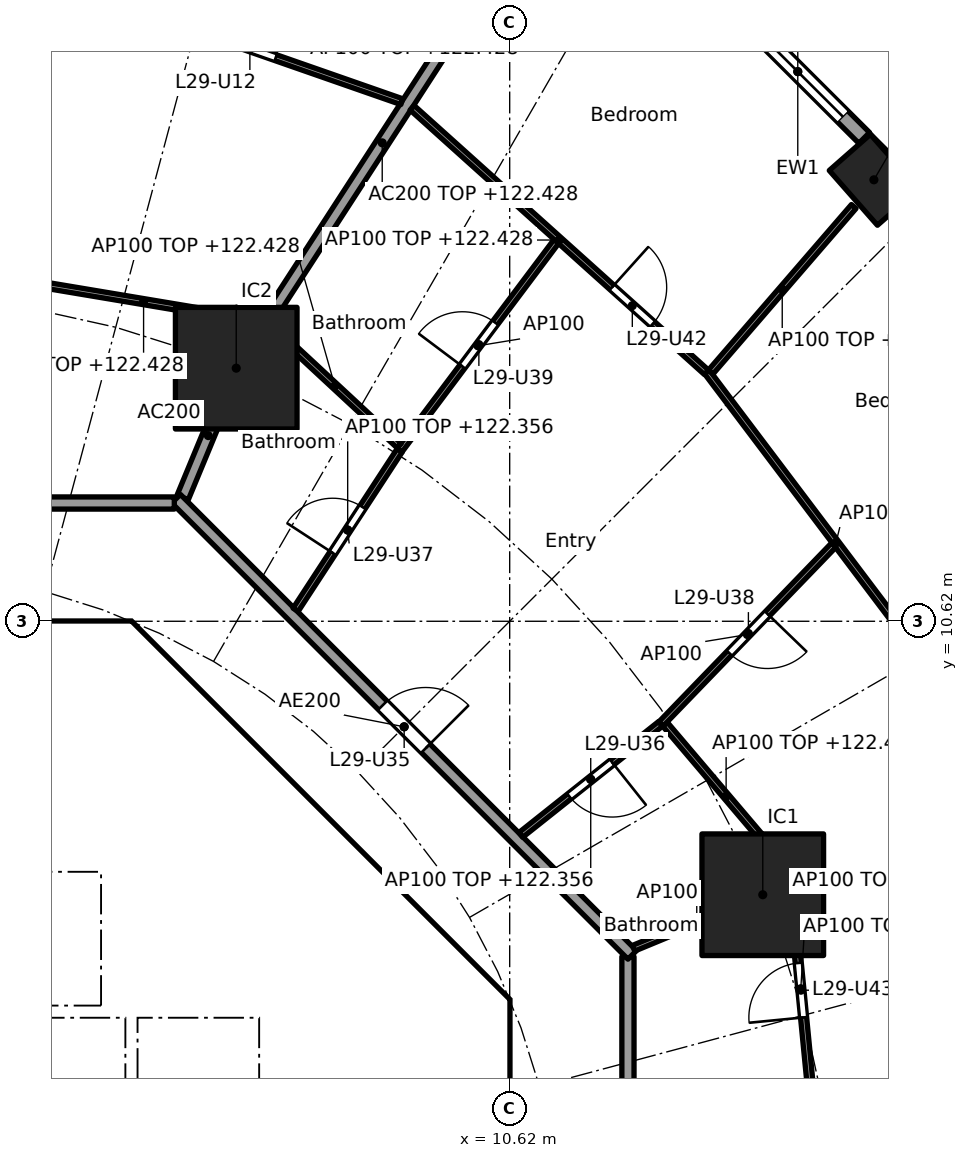
"""IFC4 building model, lengths in metres.
Left out: names, types, materials, properties, quantities, classifications, styles, units other than length and angle.
Written with IfcOpenShell. Run it as: python <this file> out.ifc"""

import sys

from ifc_helpers import new_model, si_unit, direction, frame, frame_2d, origin, origin_2d, place, context, subcontext, project, spatial, polyline, rectangle, hollow_rectangle, outline, extrude, element, fill, save


model = new_model("IFC4")
c1 = context("Model", 3, precision=1e-05, world=origin(), true_north=direction((0.0, 1.0)))
c2 = subcontext(c1, "Body", "Model", "MODEL_VIEW")
j1 = project(units=[si_unit("LENGTHUNIT", "METRE"), si_unit("PLANEANGLEUNIT", "RADIAN")], contexts=[c1])
p1 = place(None, origin())
s1 = spatial("IfcSite", under=j1, at=p1, CompositionType="ELEMENT")
p2 = place(p1, origin())
s2 = spatial("IfcBuilding", under=s1, at=p2, CompositionType="ELEMENT")
p3 = place(p2, frame((0.0, 0.0, 119.6)))
s3 = spatial("IfcBuildingStorey", under=s2, at=p3, CompositionType="ELEMENT", Elevation=119.6)
p4 = place(p3, frame((16.61, 17.88, -0.26), z_axis=(0.0, 0.0, 1.0), x_axis=(-0.660114607735, 0.751164898445, 0.0)))
e1 = element("IfcColumn", 1, at=p4, inside=s3, PredefinedType="COLUMN", context=c2, shape_type="SweptSolid", body=[
    extrude(hollow_rectangle(XDim=1.2, YDim=0.9, WallThickness=0.04, at=origin_2d()), origin(), (0.0, 0.0, 1.0), 3.96),
])
for number, where, z_axis, x_axis in (
    (2, (14.782, 6.123, 0.0), (0.0, 0.0, 1.0), (1.0, 0.0, 0.0)),
    (3, (6.123, 14.782, 0.0), (0.0, 0.0, 1.0), (1.0, 0.0, 0.0)),
):
    element("IfcColumn", number, at=place(p3, frame(where, z_axis=z_axis, x_axis=x_axis)), inside=s3, PredefinedType="COLUMN", context=c2, shape_type="SweptSolid", body=[
        extrude(rectangle(XDim=2.0, YDim=2.0, at=origin_2d()), origin(), (0.0, 0.0, 1.0), 3.7),
    ])
p5 = place(p3, frame((14.265, 20.749, 0.0), z_axis=(0.0, 0.0, 1.0), x_axis=(0.70789728551, -0.706315392135, 0.0)))
e4 = element("IfcWall", 4, at=p5, inside=s3, PredefinedType="SOLIDWALL", context=c2, shape_type="SweptSolid", body=[
    extrude(rectangle(XDim=3.087, YDim=0.25, at=frame_2d((1.543, 0.0))), origin(), (0.0, 0.0, 1.0), 3.44),
])
p6 = place(p5, frame((0.493, 0.0, 0.0)))
e5 = element("IfcOpeningElement", 5, at=p6, cuts=e4, PredefinedType="OPENING", context=c2, shape_type="SweptSolid", body=[
    extrude(rectangle(XDim=2.1, YDim=2.4, at=frame_2d((1.05, 1.2))), frame((0.0, 0.135, 0.0), z_axis=(0.0, -1.0, 0.0), x_axis=(1.0, 0.0, 0.0)), (0.0, 0.0, 1.0), 0.27),
])
p7 = place(p3, frame((14.315, 26.993, 0.0), z_axis=(0.0, 0.0, 1.0), x_axis=(0.610279766338, -0.792185967307, 0.0)))
e6 = element("IfcWall", 6, at=p7, inside=s3, PredefinedType="SOLIDWALL", context=c2, shape_type="SweptSolid", body=[
    extrude(rectangle(XDim=10.842, YDim=1.6, at=frame_2d((5.421, 0.0))), origin(), (0.0, 0.0, 1.0), 1.1),
])
p8 = place(p3, frame((9.988, 4.613, 0.0), z_axis=(0.0, 0.0, 1.0), x_axis=(-0.707106781187, 0.707106781187, 0.0)))
e7 = element("IfcWall", 7, at=p8, inside=s3, PredefinedType="SHEAR", context=c2, shape_type="SweptSolid", body=[
    extrude(rectangle(XDim=7.602, YDim=0.6, at=frame_2d((3.801, 0.0))), origin(), (0.0, 0.0, 1.0), 3.44),
])
p9 = place(p8, frame((3.201, 0.0, 0.0)))
e8 = element("IfcOpeningElement", 8, at=p9, cuts=e7, PredefinedType="OPENING", context=c2, shape_type="SweptSolid", body=[
    extrude(rectangle(XDim=1.2, YDim=2.1, at=frame_2d((0.6, 1.05))), frame((0.0, 0.31, 0.0), z_axis=(0.0, -1.0, 0.0), x_axis=(1.0, 0.0, 0.0)), (0.0, 0.0, 1.0), 0.62),
])
p10 = place(p3, frame((4.0, 4.3, 0.0), z_axis=(0.0, 0.0, 1.0), x_axis=(0.0, 1.0, 0.0)))
e9 = element("IfcWall", 9, at=p10, inside=s3, PredefinedType="SOLIDWALL", context=c2, shape_type="SweptSolid", body=[
    extrude(rectangle(XDim=2.2, YDim=0.2, at=frame_2d((1.1, 0.0))), origin(), (0.0, 0.0, 1.0), 3.44),
])
p11 = place(p10, frame((0.55, 0.0, 0.0)))
e10 = element("IfcOpeningElement", 10, at=p11, cuts=e9, PredefinedType="OPENING", context=c2, shape_type="SweptSolid", body=[
    extrude(rectangle(XDim=1.1, YDim=2.1, at=frame_2d((0.55, 1.05))), frame((0.0, 0.11, 0.0), z_axis=(0.0, -1.0, 0.0), x_axis=(1.0, 0.0, 0.0)), (0.0, 0.0, 1.0), 0.22),
])
p12 = place(p3, frame((6.7, 4.0, 0.0), z_axis=(0.0, 0.0, 1.0), x_axis=(1.0, 0.0, 0.0)))
e11 = element("IfcWall", 11, at=p12, inside=s3, PredefinedType="SOLIDWALL", context=c2, shape_type="SweptSolid", body=[
    extrude(rectangle(XDim=3.325, YDim=0.2, at=frame_2d((1.662, 0.0))), origin(), (0.0, 0.0, 1.0), 3.44),
])
p13 = place(p12, frame((1.25, 0.0, 0.0)))
e12 = element("IfcOpeningElement", 12, at=p13, cuts=e11, PredefinedType="OPENING", context=c2, shape_type="SweptSolid", body=[
    extrude(rectangle(XDim=1.1, YDim=2.1, at=frame_2d((0.55, 1.05))), frame((0.0, 0.11, 0.0), z_axis=(0.0, -1.0, 0.0), x_axis=(1.0, 0.0, 0.0)), (0.0, 0.0, 1.0), 0.22),
])
p14 = place(p3, frame((4.0, 7.025, 0.0), z_axis=(0.0, 0.0, 1.0), x_axis=(0.0, 1.0, 0.0)))
e13 = element("IfcWall", 13, at=p14, inside=s3, PredefinedType="SOLIDWALL", context=c2, shape_type="SweptSolid", body=[
    extrude(rectangle(XDim=3.0, YDim=0.2, at=frame_2d((1.5, 0.0))), origin(), (0.0, 0.0, 1.0), 3.44),
])
p15 = place(p14, frame((0.925, 0.0, 0.0)))
e14 = element("IfcOpeningElement", 14, at=p15, cuts=e13, PredefinedType="OPENING", context=c2, shape_type="SweptSolid", body=[
    extrude(rectangle(XDim=1.1, YDim=2.1, at=frame_2d((0.55, 1.05))), frame((0.0, 0.11, 0.0), z_axis=(0.0, -1.0, 0.0), x_axis=(1.0, 0.0, 0.0)), (0.0, 0.0, 1.0), 0.22),
])
p16 = place(p3, origin())
e15 = element("IfcWall", 15, at=p16, inside=s3, PredefinedType="SHEAR", context=c2, shape_type="SweptSolid", body=[
    extrude(outline(polyline([(-4.152, 10.025), (-4.401, 9.776), (-4.825, 10.2), (-4.401, 10.625), (4.401, 10.625), (4.825, 10.2), (4.401, 9.776), (4.152, 10.025), (-4.152, 10.025)])), origin(), (0.0, 0.0, 1.0), 3.44),
])
p17 = place(p3, origin())
e16 = element("IfcWall", 16, at=p17, inside=s3, PredefinedType="SHEAR", context=c2, shape_type="SweptSolid", body=[
    extrude(outline(polyline([(9.776, -4.401), (10.025, -4.152), (10.025, -3.801), (10.025, 4.152), (9.776, 4.401), (10.2, 4.825), (10.625, 4.401), (10.625, -4.401), (10.2, -4.825), (9.776, -4.401)])), origin(), (0.0, 0.0, 1.0), 3.44),
])
p18 = place(p3, origin())
e17 = element("IfcWall", 17, at=p18, inside=s3, PredefinedType="SOLIDWALL", context=c2, shape_type="SweptSolid", body=[
    extrude(outline(polyline([(-6.5, 2.1), (-6.7, 2.1), (-6.7, 4.3), (6.7, 4.3), (6.7, 2.1), (6.5, 2.1), (6.5, 4.1), (4.5, 4.1), (4.5, 2.1), (4.3, 2.1), (4.3, 4.1), (2.3, 4.1), (2.3, 2.1), (2.1, 2.1), (2.1, 4.1), (0.1, 4.1), (0.1, 2.1), (-0.1, 2.1), (-0.1, 4.1), (-2.1, 4.1), (-2.1, 2.1), (-2.3, 2.1), (-2.3, 4.1), (-4.3, 4.1), (-4.3, 2.1), (-4.5, 2.1), (-4.5, 4.1), (-6.5, 4.1), (-6.5, 2.1)])), origin(), (0.0, 0.0, 1.0), 3.44),
])
p19 = place(p3, origin())
e18 = element("IfcWall", 18, at=p19, inside=s3, PredefinedType="SOLIDWALL", context=c2, shape_type="SweptSolid", body=[
    extrude(outline(polyline([(4.1, 6.5), (-4.1, 6.5), (-4.1, 7.025), (4.1, 7.025), (4.1, 6.5)])), origin(), (0.0, 0.0, 1.0), 3.44),
])
p20 = place(p3, origin())
e19 = element("IfcWall", 19, at=p20, inside=s3, PredefinedType="SOLIDWALL", context=c2, shape_type="SweptSolid", body=[
    extrude(outline(polyline([(7.025, -3.9), (6.7, -3.9), (6.7, 3.9), (7.025, 3.9), (7.025, -3.9)])), origin(), (0.0, 0.0, 1.0), 3.44),
])
p21 = place(p3, frame((5.243, 12.657, 0.0), z_axis=(0.0, 0.0, 1.0), x_axis=(0.38273085373, 0.923859888513, 0.0)))
e20 = element("IfcWall", 20, at=p21, inside=s3, PredefinedType="PARTITIONING", context=c2, shape_type="SweptSolid", body=[
    extrude(rectangle(XDim=2.199, YDim=0.2, at=frame_2d((1.1, 0.0))), origin(), (0.0, 0.0, 1.0), 3.44),
])
p22 = place(p3, frame((6.15, 14.824, 0.0), z_axis=(0.0, 0.0, 1.0), x_axis=(0.543695254109, 0.839282711998, 0.0)))
e21 = element("IfcWall", 21, at=p22, inside=s3, PredefinedType="PARTITIONING", context=c2, shape_type="SweptSolid", body=[
    extrude(rectangle(XDim=8.731, YDim=0.2, at=frame_2d((4.366, 0.0))), origin(), (0.0, 0.0, 1.0), 2.828),
])
p23 = place(p3, frame((12.565, -5.104, 0.0), z_axis=(0.0, 0.0, 1.0), x_axis=(0.0, 1.0, 0.0)))
e22 = element("IfcWall", 22, at=p23, inside=s3, PredefinedType="PARTITIONING", context=c2, shape_type="SweptSolid", body=[
    extrude(rectangle(XDim=10.209, YDim=0.2, at=frame_2d((5.104, 0.0))), origin(), (0.0, 0.0, 1.0), 3.44),
])
p24 = place(p3, frame((12.635, 5.134, 0.0), z_axis=(0.0, 0.0, 1.0), x_axis=(-0.707106781187, 0.707106781187, 0.0)))
e23 = element("IfcWall", 23, at=p24, inside=s3, PredefinedType="PARTITIONING", context=c2, shape_type="SweptSolid", body=[
    extrude(rectangle(XDim=10.609, YDim=0.2, at=frame_2d((5.305, 0.0))), origin(), (0.0, 0.0, 1.0), 3.44),
])
p25 = place(p24, frame((4.804, 0.0, 0.0)))
e24 = element("IfcOpeningElement", 24, at=p25, cuts=e23, PredefinedType="OPENING", context=c2, shape_type="SweptSolid", body=[
    extrude(rectangle(XDim=1.0, YDim=2.1, at=frame_2d((0.5, 1.05))), frame((0.0, 0.11, 0.0), z_axis=(0.0, -1.0, 0.0), x_axis=(1.0, 0.0, 0.0)), (0.0, 0.0, 1.0), 0.22),
])
p26 = place(p3, frame((5.104, 12.565, 0.0), z_axis=(0.0, 0.0, 1.0), x_axis=(-1.0, 0.0, 0.0)))
e25 = element("IfcWall", 25, at=p26, inside=s3, PredefinedType="PARTITIONING", context=c2, shape_type="SweptSolid", body=[
    extrude(rectangle(XDim=10.409, YDim=0.2, at=frame_2d((5.205, 0.0))), origin(), (0.0, 0.0, 1.0), 3.44),
])
p27 = place(p3, frame((15.602, 2.584, 0.0), z_axis=(0.0, 0.0, 1.0), x_axis=(-0.097216297846, 0.995263277446, 0.0)))
e26 = element("IfcWall", 26, at=p27, inside=s3, PredefinedType="PARTITIONING", context=c2, shape_type="SweptSolid", body=[
    extrude(rectangle(XDim=4.006, YDim=0.1, at=frame_2d((2.003, 0.0))), origin(), (0.0, 0.0, 1.0), 2.828),
])
p28 = place(p27, frame((1.528, 0.0, 0.0)))
e27 = element("IfcOpeningElement", 27, at=p28, cuts=e26, PredefinedType="OPENING", context=c2, shape_type="SweptSolid", body=[
    extrude(rectangle(XDim=0.9, YDim=2.1, at=frame_2d((0.45, 1.05))), frame((0.0, 0.06, 0.0), z_axis=(0.0, -1.0, 0.0), x_axis=(1.0, 0.0, 0.0)), (0.0, 0.0, 1.0), 0.12),
])
p29 = place(p3, frame((12.657, 5.243, 0.0), z_axis=(0.0, 0.0, 1.0), x_axis=(0.923864733477, 0.382719158442, 0.0)))
e28 = element("IfcWall", 28, at=p29, inside=s3, PredefinedType="PARTITIONING", context=c2, shape_type="SweptSolid", body=[
    extrude(rectangle(XDim=2.25, YDim=0.1, at=frame_2d((1.125, 0.0))), origin(), (0.0, 0.0, 1.0), 3.44),
])
p30 = place(p3, frame((15.185, 6.559, 0.0), z_axis=(0.0, 0.0, 1.0), x_axis=(-0.647360926376, 0.762183594026, 0.0)))
e29 = element("IfcWall", 29, at=p30, inside=s3, PredefinedType="PARTITIONING", context=c2, shape_type="SweptSolid", body=[
    extrude(rectangle(XDim=3.106, YDim=0.1, at=frame_2d((1.553, 0.0))), origin(), (0.0, 0.0, 1.0), 2.828),
])
p31 = place(p3, frame((18.106, 9.098, 0.0), z_axis=(0.0, 0.0, 1.0), x_axis=(-0.602398572907, 0.798195439325, 0.0)))
e30 = element("IfcWall", 30, at=p31, inside=s3, PredefinedType="PARTITIONING", context=c2, shape_type="SweptSolid", body=[
    extrude(rectangle(XDim=7.044, YDim=0.1, at=frame_2d((3.522, 0.0))), origin(), (0.0, 0.0, 1.0), 2.828),
])
p32 = place(p3, frame((10.803, 7.107, 0.0), z_axis=(0.0, 0.0, 1.0), x_axis=(0.782908385935, 0.622137010017, 0.0)))
e31 = element("IfcWall", 31, at=p32, inside=s3, PredefinedType="PARTITIONING", context=c2, shape_type="SweptSolid", body=[
    extrude(rectangle(XDim=2.937, YDim=0.1, at=frame_2d((1.469, 0.0))), origin(), (0.0, 0.0, 1.0), 2.756),
])
p33 = place(p32, frame((1.019, 0.0, 0.0)))
e32 = element("IfcOpeningElement", 32, at=p33, cuts=e31, PredefinedType="OPENING", context=c2, shape_type="SweptSolid", body=[
    extrude(rectangle(XDim=0.9, YDim=2.1, at=frame_2d((0.45, 1.05))), frame((0.0, 0.06, 0.0), z_axis=(0.0, -1.0, 0.0), x_axis=(1.0, 0.0, 0.0)), (0.0, 0.0, 1.0), 0.12),
])
p34 = place(p3, frame((13.107, 8.929, 0.0), z_axis=(0.0, 0.0, 1.0), x_axis=(0.694592384931, 0.719403515974, 0.0)))
e33 = element("IfcWall", 33, at=p34, inside=s3, PredefinedType="PARTITIONING", context=c2, shape_type="SweptSolid", body=[
    extrude(rectangle(XDim=4.094, YDim=0.1, at=frame_2d((2.047, 0.0))), origin(), (0.0, 0.0, 1.0), 3.44),
])
p35 = place(p34, frame((1.622, 0.0, 0.0)))
e34 = element("IfcOpeningElement", 34, at=p35, cuts=e33, PredefinedType="OPENING", context=c2, shape_type="SweptSolid", body=[
    extrude(rectangle(XDim=0.9, YDim=2.1, at=frame_2d((0.45, 1.05))), frame((0.0, 0.06, 0.0), z_axis=(0.0, -1.0, 0.0), x_axis=(1.0, 0.0, 0.0)), (0.0, 0.0, 1.0), 0.12),
])
p36 = place(p3, frame((13.926, 14.719, 0.0), z_axis=(0.0, 0.0, 1.0), x_axis=(0.653831857253, 0.756639876323, 0.0)))
e35 = element("IfcWall", 35, at=p36, inside=s3, PredefinedType="PARTITIONING", context=c2, shape_type="SweptSolid", body=[
    extrude(rectangle(XDim=3.598, YDim=0.1, at=frame_2d((1.799, 0.0))), origin(), (0.0, 0.0, 1.0), 2.828),
])
p37 = place(p3, frame((13.856, 14.714, 0.0), z_axis=(0.0, 0.0, 1.0), x_axis=(-0.743799395746, 0.668402916577, 0.0)))
e36 = element("IfcWall", 36, at=p37, inside=s3, PredefinedType="PARTITIONING", context=c2, shape_type="SweptSolid", body=[
    extrude(rectangle(XDim=6.509, YDim=0.1, at=frame_2d((3.254, 0.0))), origin(), (0.0, 0.0, 1.0), 2.828),
])
p38 = place(p37, frame((1.19, 0.0, 0.0)))
e37 = element("IfcOpeningElement", 37, at=p38, cuts=e36, PredefinedType="OPENING", context=c2, shape_type="SweptSolid", body=[
    extrude(rectangle(XDim=0.9, YDim=2.1, at=frame_2d((0.45, 1.05))), frame((0.0, 0.06, 0.0), z_axis=(0.0, -1.0, 0.0), x_axis=(1.0, 0.0, 0.0)), (0.0, 0.0, 1.0), 0.12),
])
p39 = place(p3, frame((7.099, 10.808, 0.0), z_axis=(0.0, 0.0, 1.0), x_axis=(0.546709757921, 0.837322184463, 0.0)))
e38 = element("IfcWall", 38, at=p39, inside=s3, PredefinedType="PARTITIONING", context=c2, shape_type="SweptSolid", body=[
    extrude(rectangle(XDim=3.134, YDim=0.1, at=frame_2d((1.567, 0.0))), origin(), (0.0, 0.0, 1.0), 2.756),
])
p40 = place(p39, frame((1.117, 0.0, 0.0)))
e39 = element("IfcOpeningElement", 39, at=p40, cuts=e38, PredefinedType="OPENING", context=c2, shape_type="SweptSolid", body=[
    extrude(rectangle(XDim=0.9, YDim=2.1, at=frame_2d((0.45, 1.05))), frame((0.0, 0.06, 0.0), z_axis=(0.0, -1.0, 0.0), x_axis=(1.0, 0.0, 0.0)), (0.0, 0.0, 1.0), 0.12),
])
p41 = place(p3, frame((8.81, 13.434, 0.0), z_axis=(0.0, 0.0, 1.0), x_axis=(0.600491337497, 0.799631261014, 0.0)))
e40 = element("IfcWall", 40, at=p41, inside=s3, PredefinedType="PARTITIONING", context=c2, shape_type="SweptSolid", body=[
    extrude(rectangle(XDim=4.292, YDim=0.1, at=frame_2d((2.146, 0.0))), origin(), (0.0, 0.0, 1.0), 3.44),
])
p42 = place(p41, frame((1.721, 0.0, 0.0)))
e41 = element("IfcOpeningElement", 41, at=p42, cuts=e40, PredefinedType="OPENING", context=c2, shape_type="SweptSolid", body=[
    extrude(rectangle(XDim=0.9, YDim=2.1, at=frame_2d((0.45, 1.05))), frame((0.0, 0.06, 0.0), z_axis=(0.0, -1.0, 0.0), x_axis=(1.0, 0.0, 0.0)), (0.0, 0.0, 1.0), 0.12),
])
p43 = place(p3, frame((8.803, 13.508, 0.0), z_axis=(0.0, 0.0, 1.0), x_axis=(-0.733124766325, 0.680094167745, 0.0)))
e42 = element("IfcWall", 42, at=p43, inside=s3, PredefinedType="PARTITIONING", context=c2, shape_type="SweptSolid", body=[
    extrude(rectangle(XDim=2.886, YDim=0.1, at=frame_2d((1.443, 0.0))), origin(), (0.0, 0.0, 1.0), 2.828),
])
p44 = place(p3, frame((6.515, 15.556, 0.0), z_axis=(0.0, 0.0, 1.0), x_axis=(-0.986271328884, 0.16513287323, 0.0)))
e43 = element("IfcWall", 43, at=p44, inside=s3, PredefinedType="PARTITIONING", context=c2, shape_type="SweptSolid", body=[
    extrude(rectangle(XDim=3.884, YDim=0.1, at=frame_2d((1.942, 0.0))), origin(), (0.0, 0.0, 1.0), 2.828),
])
p45 = place(p3, frame((8.846, 19.165, 0.0), z_axis=(0.0, 0.0, 1.0), x_axis=(-0.944186503813, 0.329411362915, 0.0)))
e44 = element("IfcWall", 44, at=p45, inside=s3, PredefinedType="PARTITIONING", context=c2, shape_type="SweptSolid", body=[
    extrude(rectangle(XDim=5.293, YDim=0.1, at=frame_2d((2.646, 0.0))), origin(), (0.0, 0.0, 1.0), 2.828),
])
p46 = place(p45, frame((2.197, 0.0, 0.0)))
e45 = element("IfcOpeningElement", 45, at=p46, cuts=e44, PredefinedType="OPENING", context=c2, shape_type="SweptSolid", body=[
    extrude(rectangle(XDim=0.9, YDim=2.1, at=frame_2d((0.45, 1.05))), frame((0.0, 0.06, 0.0), z_axis=(0.0, -1.0, 0.0), x_axis=(1.0, 0.0, 0.0)), (0.0, 0.0, 1.0), 0.12),
])
p47 = place(p6, origin())
e46 = element("IfcDoor", 46, at=p47, inside=s3, OperationType="SLIDING_TO_LEFT", PredefinedType="DOOR", context=c2, shape_type="SweptSolid", body=[
    extrude(rectangle(XDim=2.1, YDim=2.4, at=frame_2d((1.05, 1.2))), frame((0.0, 0.025, 0.0), z_axis=(0.0, -1.0, 0.0), x_axis=(1.0, 0.0, 0.0)), (0.0, 0.0, 1.0), 0.05),
])
fill(e5, e46)
p48 = place(p11, origin())
e47 = element("IfcDoor", 47, at=p48, inside=s3, OperationType="DOUBLE_DOOR_SLIDING", PredefinedType="DOOR", context=c2, shape_type="SweptSolid", body=[
    extrude(rectangle(XDim=1.1, YDim=2.1, at=frame_2d((0.55, 1.05))), frame((0.0, 0.025, 0.0), z_axis=(0.0, -1.0, 0.0), x_axis=(1.0, 0.0, 0.0)), (0.0, 0.0, 1.0), 0.05),
])
fill(e10, e47)
p49 = place(p13, frame((1.1, 0.0, 0.0), x_axis=(-1.0, 0.0, 0.0)))
e48 = element("IfcDoor", 48, at=p49, inside=s3, OperationType="SINGLE_SWING_LEFT", PredefinedType="DOOR", context=c2, shape_type="SweptSolid", body=[
    extrude(rectangle(XDim=1.1, YDim=2.1, at=frame_2d((0.55, 1.05))), frame((0.0, 0.025, 0.0), z_axis=(0.0, -1.0, 0.0), x_axis=(1.0, 0.0, 0.0)), (0.0, 0.0, 1.0), 0.05),
])
fill(e12, e48)
p50 = place(p15, origin())
e49 = element("IfcDoor", 49, at=p50, inside=s3, OperationType="SINGLE_SWING_RIGHT", PredefinedType="DOOR", context=c2, shape_type="SweptSolid", body=[
    extrude(rectangle(XDim=1.1, YDim=2.1, at=frame_2d((0.55, 1.05))), frame((0.0, 0.025, 0.0), z_axis=(0.0, -1.0, 0.0), x_axis=(1.0, 0.0, 0.0)), (0.0, 0.0, 1.0), 0.05),
])
fill(e14, e49)
p51 = place(p9, origin())
e50 = element("IfcDoor", 50, at=p51, inside=s3, OperationType="SINGLE_SWING_RIGHT", PredefinedType="DOOR", context=c2, shape_type="SweptSolid", body=[
    extrude(rectangle(XDim=1.2, YDim=2.1, at=frame_2d((0.6, 1.05))), frame((0.0, 0.025, 0.0), z_axis=(0.0, -1.0, 0.0), x_axis=(1.0, 0.0, 0.0)), (0.0, 0.0, 1.0), 0.05),
])
fill(e8, e50)
p52 = place(p46, frame((0.9, 0.0, 0.0), x_axis=(-1.0, 0.0, 0.0)))
e51 = element("IfcDoor", 51, at=p52, inside=s3, OperationType="SINGLE_SWING_LEFT", PredefinedType="DOOR", context=c2, shape_type="SweptSolid", body=[
    extrude(rectangle(XDim=0.9, YDim=2.1, at=frame_2d((0.45, 1.05))), frame((0.0, 0.025, 0.0), z_axis=(0.0, -1.0, 0.0), x_axis=(1.0, 0.0, 0.0)), (0.0, 0.0, 1.0), 0.05),
])
fill(e45, e51)
p53 = place(p25, frame((1.0, 0.0, 0.0), x_axis=(-1.0, 0.0, 0.0)))
e52 = element("IfcDoor", 52, at=p53, inside=s3, OperationType="SINGLE_SWING_RIGHT", PredefinedType="DOOR", context=c2, shape_type="SweptSolid", body=[
    extrude(rectangle(XDim=1.0, YDim=2.1, at=frame_2d((0.5, 1.05))), frame((0.0, 0.025, 0.0), z_axis=(0.0, -1.0, 0.0), x_axis=(1.0, 0.0, 0.0)), (0.0, 0.0, 1.0), 0.05),
])
fill(e24, e52)
p54 = place(p33, frame((0.9, 0.0, 0.0), x_axis=(-1.0, 0.0, 0.0)))
e53 = element("IfcDoor", 53, at=p54, inside=s3, OperationType="SINGLE_SWING_LEFT", PredefinedType="DOOR", context=c2, shape_type="SweptSolid", body=[
    extrude(rectangle(XDim=0.9, YDim=2.1, at=frame_2d((0.45, 1.05))), frame((0.0, 0.025, 0.0), z_axis=(0.0, -1.0, 0.0), x_axis=(1.0, 0.0, 0.0)), (0.0, 0.0, 1.0), 0.05),
])
fill(e32, e53)
p55 = place(p40, origin())
e54 = element("IfcDoor", 54, at=p55, inside=s3, OperationType="SINGLE_SWING_LEFT", PredefinedType="DOOR", context=c2, shape_type="SweptSolid", body=[
    extrude(rectangle(XDim=0.9, YDim=2.1, at=frame_2d((0.45, 1.05))), frame((0.0, 0.025, 0.0), z_axis=(0.0, -1.0, 0.0), x_axis=(1.0, 0.0, 0.0)), (0.0, 0.0, 1.0), 0.05),
])
fill(e39, e54)
p56 = place(p35, frame((0.9, 0.0, 0.0), x_axis=(-1.0, 0.0, 0.0)))
e55 = element("IfcDoor", 55, at=p56, inside=s3, OperationType="SINGLE_SWING_LEFT", PredefinedType="DOOR", context=c2, shape_type="SweptSolid", body=[
    extrude(rectangle(XDim=0.9, YDim=2.1, at=frame_2d((0.45, 1.05))), frame((0.0, 0.025, 0.0), z_axis=(0.0, -1.0, 0.0), x_axis=(1.0, 0.0, 0.0)), (0.0, 0.0, 1.0), 0.05),
])
fill(e34, e55)
p57 = place(p42, origin())
e56 = element("IfcDoor", 56, at=p57, inside=s3, OperationType="SINGLE_SWING_LEFT", PredefinedType="DOOR", context=c2, shape_type="SweptSolid", body=[
    extrude(rectangle(XDim=0.9, YDim=2.1, at=frame_2d((0.45, 1.05))), frame((0.0, 0.025, 0.0), z_axis=(0.0, -1.0, 0.0), x_axis=(1.0, 0.0, 0.0)), (0.0, 0.0, 1.0), 0.05),
])
fill(e41, e56)
p58 = place(p38, frame((0.9, 0.0, 0.0), x_axis=(-1.0, 0.0, 0.0)))
e57 = element("IfcDoor", 57, at=p58, inside=s3, OperationType="SINGLE_SWING_LEFT", PredefinedType="DOOR", context=c2, shape_type="SweptSolid", body=[
    extrude(rectangle(XDim=0.9, YDim=2.1, at=frame_2d((0.45, 1.05))), frame((0.0, 0.025, 0.0), z_axis=(0.0, -1.0, 0.0), x_axis=(1.0, 0.0, 0.0)), (0.0, 0.0, 1.0), 0.05),
])
fill(e37, e57)
p59 = place(p28, origin())
e58 = element("IfcDoor", 58, at=p59, inside=s3, OperationType="SINGLE_SWING_LEFT", PredefinedType="DOOR", context=c2, shape_type="SweptSolid", body=[
    extrude(rectangle(XDim=0.9, YDim=2.1, at=frame_2d((0.45, 1.05))), frame((0.0, 0.025, 0.0), z_axis=(0.0, -1.0, 0.0), x_axis=(1.0, 0.0, 0.0)), (0.0, 0.0, 1.0), 0.05),
])
fill(e27, e58)
save(model, sys.argv[1])
